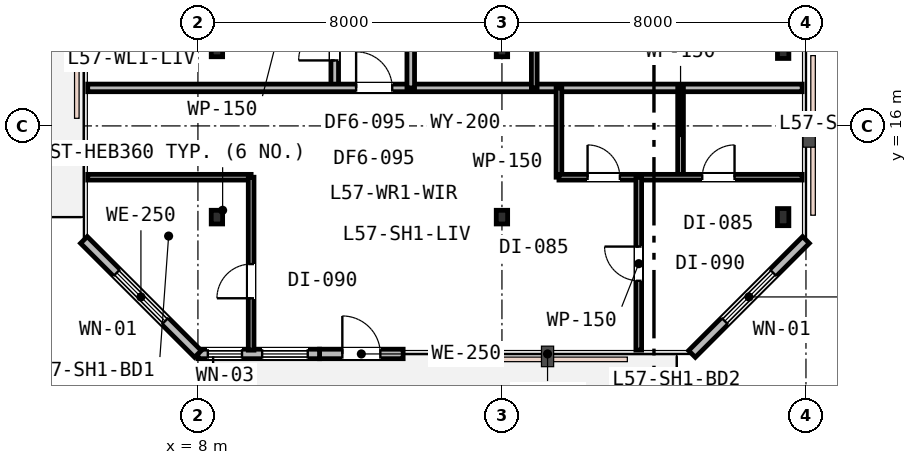
"""IFC4 building model, lengths in metres.
Left out: names, types, materials, properties, quantities, classifications, styles, units other than length and angle.
Written with IfcOpenShell. Run it as: python <this file> out.ifc"""

import sys

from ifc_helpers import new_model, si_unit, direction, frame, frame_2d, origin, origin_2d, place, context, subcontext, project, spatial, rectangle, i_section, extrude, element, fill, save


model = new_model("IFC4")
c1 = context("Model", 3, precision=1e-05, world=origin(), true_north=direction((0.0, 1.0)))
c2 = subcontext(c1, "Body", "Model", "MODEL_VIEW")
j1 = project(units=[si_unit("LENGTHUNIT", "METRE"), si_unit("PLANEANGLEUNIT", "RADIAN")], contexts=[c1])
p1 = place(None, origin())
s1 = spatial("IfcSite", under=j1, at=p1, CompositionType="ELEMENT")
p2 = place(p1, origin())
s2 = spatial("IfcBuilding", under=s1, at=p2, CompositionType="ELEMENT")
p3 = place(p2, frame((0.0, 0.0, 222.2)))
s3 = spatial("IfcBuildingStorey", under=s2, at=p3, CompositionType="ELEMENT", Elevation=222.2)
for number, where, z_axis, x_axis in (
    (1, (23.4, 13.6, 0.0), (0.0, 0.0, 1.0), (1.0, 0.0, 0.0)),
    (2, (23.4, 18.0, 0.0), (0.0, 0.0, 1.0), (1.0, 0.0, 0.0)),
):
    element("IfcColumn", number, at=place(p3, frame(where, z_axis=z_axis, x_axis=x_axis)), inside=s3, PredefinedType="COLUMN", context=c2, shape_type="SweptSolid", body=[
        extrude(i_section(OverallWidth=0.3, OverallDepth=0.45, WebThickness=0.014, FlangeThickness=0.026, FilletRadius=0.027, at=origin_2d()), origin(), (0.0, 0.0, 1.0), 3.8),
    ])
for number, where, z_axis, x_axis in (
    (3, (8.5, 13.6, 0.0), (0.0, 0.0, 1.0), (1.0, 0.0, 0.0)),
    (4, (16.0, 13.6, 0.0), (0.0, 0.0, 1.0), (1.0, 0.0, 0.0)),
    (5, (8.5, 18.0, 0.0), (0.0, 0.0, 1.0), (1.0, 0.0, 0.0)),
    (6, (16.0, 18.0, 0.0), (0.0, 0.0, 1.0), (1.0, 0.0, 0.0)),
):
    element("IfcColumn", number, at=place(p3, frame(where, z_axis=z_axis, x_axis=x_axis)), inside=s3, PredefinedType="COLUMN", context=c2, shape_type="SweptSolid", body=[
        extrude(i_section(OverallWidth=0.3, OverallDepth=0.36, WebThickness=0.013, FlangeThickness=0.022, FilletRadius=0.027, at=origin_2d()), origin(), (0.0, 0.0, 1.0), 3.8),
    ])
p4 = place(p3, frame((11.2, 10.0, 0.0), z_axis=(0.0, 0.0, 1.0), x_axis=(1.0, 0.0, 0.0)))
e7 = element("IfcWall", 7, at=p4, inside=s3, PredefinedType="STANDARD", context=c2, shape_type="SweptSolid", body=[
    extrude(rectangle(XDim=2.2, YDim=0.25, at=frame_2d((1.1, 0.0))), origin(), (0.0, 0.0, 1.0), 3.53),
])
p5 = place(p4, frame((0.6, 0.0, 0.0)))
e8 = element("IfcOpeningElement", 8, at=p5, cuts=e7, PredefinedType="OPENING", context=c2, shape_type="SweptSolid", body=[
    extrude(rectangle(XDim=1.0, YDim=2.15, at=frame_2d((0.5, 1.075))), frame((0.0, 0.135, 0.0), z_axis=(0.0, -1.0, 0.0), x_axis=(1.0, 0.0, 0.0)), (0.0, 0.0, 1.0), 0.27),
])
p6 = place(p3, frame((8.0, 10.0, 0.0), z_axis=(0.0, 0.0, 1.0), x_axis=(1.0, 0.0, 0.0)))
e9 = element("IfcWall", 9, at=p6, inside=s3, PredefinedType="STANDARD", context=c2, shape_type="SweptSolid", body=[
    extrude(rectangle(XDim=3.2, YDim=0.25, at=frame_2d((1.6, 0.0))), origin(), (0.0, 0.0, 1.0), 3.53),
])
p7 = place(p6, frame((0.26, 0.0, 0.9)))
e10 = element("IfcOpeningElement", 10, at=p7, cuts=e9, PredefinedType="OPENING", context=c2, shape_type="SweptSolid", body=[
    extrude(rectangle(XDim=0.9, YDim=1.55, at=frame_2d((0.45, 0.775))), frame((0.0, 0.135, 0.0), z_axis=(0.0, -1.0, 0.0), x_axis=(1.0, 0.0, 0.0)), (0.0, 0.0, 1.0), 0.27),
])
p8 = place(p6, frame((1.69, 0.0, 0.85)))
e11 = element("IfcOpeningElement", 11, at=p8, cuts=e9, PredefinedType="OPENING", context=c2, shape_type="SweptSolid", body=[
    extrude(rectangle(XDim=1.2, YDim=1.6, at=frame_2d((0.6, 0.8))), frame((0.0, 0.135, 0.0), z_axis=(0.0, -1.0, 0.0), x_axis=(1.0, 0.0, 0.0)), (0.0, 0.0, 1.0), 0.27),
])
p9 = place(p3, frame((21.0, 10.0, 0.0), z_axis=(0.0, 0.0, 1.0), x_axis=(0.707106781187, 0.707106781187, 0.0)))
e12 = element("IfcWall", 12, at=p9, inside=s3, PredefinedType="STANDARD", context=c2, shape_type="SweptSolid", body=[
    extrude(rectangle(XDim=4.243, YDim=0.25, at=frame_2d((2.121, 0.0))), origin(), (0.0, 0.0, 1.0), 3.53),
])
p10 = place(p9, frame((1.221, 0.0, 0.75)))
e13 = element("IfcOpeningElement", 13, at=p10, cuts=e12, PredefinedType="OPENING", context=c2, shape_type="SweptSolid", body=[
    extrude(rectangle(XDim=1.8, YDim=1.85, at=frame_2d((0.9, 0.925))), frame((0.0, 0.135, 0.0), z_axis=(0.0, -1.0, 0.0), x_axis=(1.0, 0.0, 0.0)), (0.0, 0.0, 1.0), 0.27),
])
p11 = place(p3, frame((5.0, 13.0, 0.0), z_axis=(0.0, 0.0, 1.0), x_axis=(0.707106781187, -0.707106781187, 0.0)))
e14 = element("IfcWall", 14, at=p11, inside=s3, PredefinedType="STANDARD", context=c2, shape_type="SweptSolid", body=[
    extrude(rectangle(XDim=4.243, YDim=0.25, at=frame_2d((2.121, 0.0))), origin(), (0.0, 0.0, 1.0), 3.53),
])
p12 = place(p11, frame((1.221, 0.0, 0.75)))
e15 = element("IfcOpeningElement", 15, at=p12, cuts=e14, PredefinedType="OPENING", context=c2, shape_type="SweptSolid", body=[
    extrude(rectangle(XDim=1.8, YDim=1.85, at=frame_2d((0.9, 0.925))), frame((0.0, 0.135, 0.0), z_axis=(0.0, -1.0, 0.0), x_axis=(1.0, 0.0, 0.0)), (0.0, 0.0, 1.0), 0.27),
])
p13 = place(p3, frame((11.6, 17.0, 0.0), z_axis=(0.0, 0.0, 1.0), x_axis=(0.0, 1.0, 0.0)))
e16 = element("IfcWall", 16, at=p13, inside=s3, PredefinedType="PARTITIONING", context=c2, shape_type="SweptSolid", body=[
    extrude(rectangle(XDim=25.9, YDim=0.2, at=frame_2d((12.95, 0.0))), origin(), (0.0, 0.0, 1.0), 2.92),
])
p14 = place(p13, frame((12.225, 0.0, 0.0)))
e17 = element("IfcOpeningElement", 17, at=p14, cuts=e16, PredefinedType="OPENING", context=c2, shape_type="SweptSolid", body=[
    extrude(rectangle(XDim=0.95, YDim=2.15, at=frame_2d((0.475, 1.075))), frame((0.0, 0.11, 0.0), z_axis=(0.0, -1.0, 0.0), x_axis=(1.0, 0.0, 0.0)), (0.0, 0.0, 1.0), 0.22),
])
p15 = place(p13, frame((0.723, 0.0, 0.0)))
e18 = element("IfcOpeningElement", 18, at=p15, cuts=e16, PredefinedType="OPENING", context=c2, shape_type="SweptSolid", body=[
    extrude(rectangle(XDim=0.95, YDim=2.15, at=frame_2d((0.475, 1.075))), frame((0.0, 0.11, 0.0), z_axis=(0.0, -1.0, 0.0), x_axis=(1.0, 0.0, 0.0)), (0.0, 0.0, 1.0), 0.22),
])
p16 = place(p3, frame((5.1, 17.0, 0.0), z_axis=(0.0, 0.0, 1.0), x_axis=(1.0, 0.0, 0.0)))
e19 = element("IfcWall", 19, at=p16, inside=s3, PredefinedType="PARTITIONING", context=c2, shape_type="SweptSolid", body=[
    extrude(rectangle(XDim=18.8, YDim=0.2, at=frame_2d((9.4, 0.0))), origin(), (0.0, 0.0, 1.0), 2.92),
])
p17 = place(p16, frame((7.063, 0.0, 0.0)))
e20 = element("IfcOpeningElement", 20, at=p17, cuts=e19, PredefinedType="OPENING", context=c2, shape_type="SweptSolid", body=[
    extrude(rectangle(XDim=0.95, YDim=2.15, at=frame_2d((0.475, 1.075))), frame((0.0, 0.11, 0.0), z_axis=(0.0, -1.0, 0.0), x_axis=(1.0, 0.0, 0.0)), (0.0, 0.0, 1.0), 0.22),
])
p18 = place(p3, frame((13.6, 17.0, 0.0), z_axis=(0.0, 0.0, 1.0), x_axis=(0.0, 1.0, 0.0)))
e21 = element("IfcWall", 21, at=p18, inside=s3, PredefinedType="PARTITIONING", context=c2, shape_type="SweptSolid", body=[
    extrude(rectangle(XDim=11.6, YDim=0.2, at=frame_2d((5.8, 0.0))), origin(), (0.0, 0.0, 1.0), 2.92),
])
p19 = place(p18, frame((10.225, 0.0, 0.0)))
e22 = element("IfcOpeningElement", 22, at=p19, cuts=e21, PredefinedType="OPENING", context=c2, shape_type="SweptSolid", body=[
    extrude(rectangle(XDim=0.95, YDim=2.15, at=frame_2d((0.475, 1.075))), frame((0.0, 0.11, 0.0), z_axis=(0.0, -1.0, 0.0), x_axis=(1.0, 0.0, 0.0)), (0.0, 0.0, 1.0), 0.22),
])
p20 = place(p3, frame((16.85, 17.0, 0.0), z_axis=(0.0, 0.0, 1.0), x_axis=(0.0, 1.0, 0.0)))
e23 = element("IfcWall", 23, at=p20, inside=s3, PredefinedType="PARTITIONING", context=c2, shape_type="SweptSolid", body=[
    extrude(rectangle(XDim=9.8, YDim=0.15, at=frame_2d((4.9, 0.0))), origin(), (0.0, 0.0, 1.0), 2.92),
])
p21 = place(p20, frame((5.598, 0.0, 0.0)))
e24 = element("IfcOpeningElement", 24, at=p21, cuts=e23, PredefinedType="OPENING", context=c2, shape_type="SweptSolid", body=[
    extrude(rectangle(XDim=0.85, YDim=2.15, at=frame_2d((0.425, 1.075))), frame((0.0, 0.085, 0.0), z_axis=(0.0, -1.0, 0.0), x_axis=(1.0, 0.0, 0.0)), (0.0, 0.0, 1.0), 0.17),
])
p22 = place(p20, frame((8.496, 0.0, 0.0)))
e25 = element("IfcOpeningElement", 25, at=p22, cuts=e23, PredefinedType="OPENING", context=c2, shape_type="SweptSolid", body=[
    extrude(rectangle(XDim=0.85, YDim=2.15, at=frame_2d((0.425, 1.075))), frame((0.0, 0.085, 0.0), z_axis=(0.0, -1.0, 0.0), x_axis=(1.0, 0.0, 0.0)), (0.0, 0.0, 1.0), 0.17),
])
p23 = place(p20, frame((2.268, 0.0, 0.0)))
e26 = element("IfcOpeningElement", 26, at=p23, cuts=e23, PredefinedType="OPENING", context=c2, shape_type="SweptSolid", body=[
    extrude(rectangle(XDim=0.85, YDim=2.15, at=frame_2d((0.425, 1.075))), frame((0.0, 0.085, 0.0), z_axis=(0.0, -1.0, 0.0), x_axis=(1.0, 0.0, 0.0)), (0.0, 0.0, 1.0), 0.17),
])
p24 = place(p3, frame((17.5, 14.65, 0.0), z_axis=(0.0, 0.0, 1.0), x_axis=(0.0, 1.0, 0.0)))
e27 = element("IfcWall", 27, at=p24, inside=s3, PredefinedType="PARTITIONING", context=c2, shape_type="SweptSolid", body=[
    extrude(rectangle(XDim=2.35, YDim=0.15, at=frame_2d((1.175, 0.0))), origin(), (0.0, 0.0, 1.0), 3.53),
])
p25 = place(p3, frame((20.7, 14.65, 0.0), z_axis=(0.0, 0.0, 1.0), x_axis=(0.0, 1.0, 0.0)))
e28 = element("IfcWall", 28, at=p25, inside=s3, PredefinedType="PARTITIONING", context=c2, shape_type="SweptSolid", body=[
    extrude(rectangle(XDim=2.35, YDim=0.15, at=frame_2d((1.175, 0.0))), origin(), (0.0, 0.0, 1.0), 3.22),
])
p26 = place(p3, frame((17.5, 14.65, 0.0), z_axis=(0.0, 0.0, 1.0), x_axis=(1.0, 0.0, 0.0)))
e29 = element("IfcWall", 29, at=p26, inside=s3, PredefinedType="PARTITIONING", context=c2, shape_type="SweptSolid", body=[
    extrude(rectangle(XDim=6.4, YDim=0.15, at=frame_2d((3.2, 0.0))), origin(), (0.0, 0.0, 1.0), 3.22),
])
p27 = place(p26, frame((0.753, 0.0, 0.0)))
e30 = element("IfcOpeningElement", 30, at=p27, cuts=e29, PredefinedType="OPENING", context=c2, shape_type="SweptSolid", body=[
    extrude(rectangle(XDim=0.85, YDim=2.15, at=frame_2d((0.425, 1.075))), frame((0.0, 0.085, 0.0), z_axis=(0.0, -1.0, 0.0), x_axis=(1.0, 0.0, 0.0)), (0.0, 0.0, 1.0), 0.17),
])
p28 = place(p26, frame((3.771, 0.0, 0.0)))
e31 = element("IfcOpeningElement", 31, at=p28, cuts=e29, PredefinedType="OPENING", context=c2, shape_type="SweptSolid", body=[
    extrude(rectangle(XDim=0.85, YDim=2.15, at=frame_2d((0.425, 1.075))), frame((0.0, 0.085, 0.0), z_axis=(0.0, -1.0, 0.0), x_axis=(1.0, 0.0, 0.0)), (0.0, 0.0, 1.0), 0.17),
])
p29 = place(p3, frame((5.1, 14.65, 0.0), z_axis=(0.0, 0.0, 1.0), x_axis=(1.0, 0.0, 0.0)))
e32 = element("IfcWall", 32, at=p29, inside=s3, PredefinedType="PARTITIONING", context=c2, shape_type="SweptSolid", body=[
    extrude(rectangle(XDim=4.3, YDim=0.15, at=frame_2d((2.15, 0.0))), origin(), (0.0, 0.0, 1.0), 2.92),
])
p30 = place(p3, frame((9.4, 10.1, 0.0), z_axis=(0.0, 0.0, 1.0), x_axis=(0.0, 1.0, 0.0)))
e33 = element("IfcWall", 33, at=p30, inside=s3, PredefinedType="PARTITIONING", context=c2, shape_type="SweptSolid", body=[
    extrude(rectangle(XDim=4.55, YDim=0.15, at=frame_2d((2.275, 0.0))), origin(), (0.0, 0.0, 1.0), 2.92),
])
p31 = place(p30, frame((1.365, 0.0, 0.0)))
e34 = element("IfcOpeningElement", 34, at=p31, cuts=e33, PredefinedType="OPENING", context=c2, shape_type="SweptSolid", body=[
    extrude(rectangle(XDim=0.9, YDim=2.15, at=frame_2d((0.45, 1.075))), frame((0.0, 0.085, 0.0), z_axis=(0.0, -1.0, 0.0), x_axis=(1.0, 0.0, 0.0)), (0.0, 0.0, 1.0), 0.17),
])
p32 = place(p3, frame((19.6, 10.1, 0.0), z_axis=(0.0, 0.0, 1.0), x_axis=(0.0, 1.0, 0.0)))
e35 = element("IfcWall", 35, at=p32, inside=s3, PredefinedType="PARTITIONING", context=c2, shape_type="SweptSolid", body=[
    extrude(rectangle(XDim=4.55, YDim=0.15, at=frame_2d((2.275, 0.0))), origin(), (0.0, 0.0, 1.0), 2.92),
])
p33 = place(p32, frame((1.825, 0.0, 0.0)))
e36 = element("IfcOpeningElement", 36, at=p33, cuts=e35, PredefinedType="OPENING", context=c2, shape_type="SweptSolid", body=[
    extrude(rectangle(XDim=0.9, YDim=2.15, at=frame_2d((0.45, 1.075))), frame((0.0, 0.085, 0.0), z_axis=(0.0, -1.0, 0.0), x_axis=(1.0, 0.0, 0.0)), (0.0, 0.0, 1.0), 0.17),
])
p34 = place(p5, origin())
e37 = element("IfcDoor", 37, at=p34, inside=s3, OperationType="SINGLE_SWING_LEFT", PredefinedType="DOOR", context=c2, shape_type="SweptSolid", body=[
    extrude(rectangle(XDim=1.0, YDim=2.15, at=frame_2d((0.5, 1.075))), frame((0.0, 0.025, 0.0), z_axis=(0.0, -1.0, 0.0), x_axis=(1.0, 0.0, 0.0)), (0.0, 0.0, 1.0), 0.05),
])
fill(e8, e37)
p35 = place(p7, origin())
e38 = element("IfcWindow", 38, at=p35, inside=s3, PartitioningType="SINGLE_PANEL", PredefinedType="WINDOW", context=c2, shape_type="SweptSolid", body=[
    extrude(rectangle(XDim=0.9, YDim=1.55, at=frame_2d((0.45, 0.775))), frame((0.0, 0.03, 0.0), z_axis=(0.0, -1.0, 0.0), x_axis=(1.0, 0.0, 0.0)), (0.0, 0.0, 1.0), 0.06),
])
fill(e10, e38)
p36 = place(p8, origin())
e39 = element("IfcWindow", 39, at=p36, inside=s3, PartitioningType="SINGLE_PANEL", PredefinedType="WINDOW", context=c2, shape_type="SweptSolid", body=[
    extrude(rectangle(XDim=1.2, YDim=1.6, at=frame_2d((0.6, 0.8))), frame((0.0, 0.03, 0.0), z_axis=(0.0, -1.0, 0.0), x_axis=(1.0, 0.0, 0.0)), (0.0, 0.0, 1.0), 0.06),
])
fill(e11, e39)
p37 = place(p10, origin())
e40 = element("IfcWindow", 40, at=p37, inside=s3, PartitioningType="SINGLE_PANEL", PredefinedType="WINDOW", context=c2, shape_type="SweptSolid", body=[
    extrude(rectangle(XDim=1.8, YDim=1.85, at=frame_2d((0.9, 0.925))), frame((0.0, 0.03, 0.0), z_axis=(0.0, -1.0, 0.0), x_axis=(1.0, 0.0, 0.0)), (0.0, 0.0, 1.0), 0.06),
])
fill(e13, e40)
p38 = place(p12, origin())
e41 = element("IfcWindow", 41, at=p38, inside=s3, PartitioningType="SINGLE_PANEL", PredefinedType="WINDOW", context=c2, shape_type="SweptSolid", body=[
    extrude(rectangle(XDim=1.8, YDim=1.85, at=frame_2d((0.9, 0.925))), frame((0.0, 0.03, 0.0), z_axis=(0.0, -1.0, 0.0), x_axis=(1.0, 0.0, 0.0)), (0.0, 0.0, 1.0), 0.06),
])
fill(e15, e41)
p39 = place(p15, origin())
e42 = element("IfcDoor", 42, at=p39, inside=s3, OperationType="SINGLE_SWING_LEFT", PredefinedType="DOOR", context=c2, shape_type="SweptSolid", body=[
    extrude(rectangle(XDim=0.95, YDim=2.15, at=frame_2d((0.475, 1.075))), frame((0.0, 0.025, 0.0), z_axis=(0.0, -1.0, 0.0), x_axis=(1.0, 0.0, 0.0)), (0.0, 0.0, 1.0), 0.05),
])
fill(e18, e42)
p40 = place(p17, origin())
e43 = element("IfcDoor", 43, at=p40, inside=s3, OperationType="SINGLE_SWING_LEFT", PredefinedType="DOOR", context=c2, shape_type="SweptSolid", body=[
    extrude(rectangle(XDim=0.95, YDim=2.15, at=frame_2d((0.475, 1.075))), frame((0.0, 0.025, 0.0), z_axis=(0.0, -1.0, 0.0), x_axis=(1.0, 0.0, 0.0)), (0.0, 0.0, 1.0), 0.05),
])
fill(e20, e43)
p41 = place(p27, origin())
e44 = element("IfcDoor", 44, at=p41, inside=s3, OperationType="SINGLE_SWING_LEFT", PredefinedType="DOOR", context=c2, shape_type="SweptSolid", body=[
    extrude(rectangle(XDim=0.85, YDim=2.15, at=frame_2d((0.425, 1.075))), frame((0.0, 0.025, 0.0), z_axis=(0.0, -1.0, 0.0), x_axis=(1.0, 0.0, 0.0)), (0.0, 0.0, 1.0), 0.05),
])
fill(e30, e44)
p42 = place(p28, origin())
e45 = element("IfcDoor", 45, at=p42, inside=s3, OperationType="SINGLE_SWING_RIGHT", PredefinedType="DOOR", context=c2, shape_type="SweptSolid", body=[
    extrude(rectangle(XDim=0.85, YDim=2.15, at=frame_2d((0.425, 1.075))), frame((0.0, 0.025, 0.0), z_axis=(0.0, -1.0, 0.0), x_axis=(1.0, 0.0, 0.0)), (0.0, 0.0, 1.0), 0.05),
])
fill(e31, e45)
p43 = place(p31, origin())
e46 = element("IfcDoor", 46, at=p43, inside=s3, OperationType="SINGLE_SWING_LEFT", PredefinedType="DOOR", context=c2, shape_type="SweptSolid", body=[
    extrude(rectangle(XDim=0.9, YDim=2.15, at=frame_2d((0.45, 1.075))), frame((0.0, 0.025, 0.0), z_axis=(0.0, -1.0, 0.0), x_axis=(1.0, 0.0, 0.0)), (0.0, 0.0, 1.0), 0.05),
])
fill(e34, e46)
p44 = place(p33, origin())
e47 = element("IfcDoor", 47, at=p44, inside=s3, OperationType="SINGLE_SWING_RIGHT", PredefinedType="DOOR", context=c2, shape_type="SweptSolid", body=[
    extrude(rectangle(XDim=0.9, YDim=2.15, at=frame_2d((0.45, 1.075))), frame((0.0, 0.025, 0.0), z_axis=(0.0, -1.0, 0.0), x_axis=(1.0, 0.0, 0.0)), (0.0, 0.0, 1.0), 0.05),
])
fill(e36, e47)
save(model, sys.argv[1])
